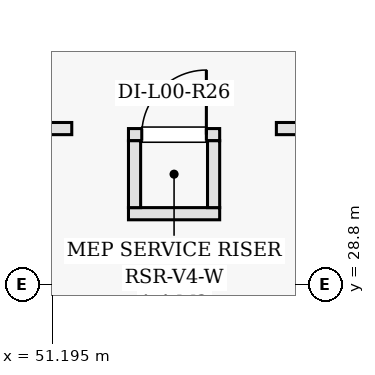
"""IFC4 building model, lengths in metres.
Left out: names, types, materials, properties, quantities, classifications, styles, units other than length and angle.
Written with IfcOpenShell. Run it as: python <this file> out.ifc"""

import sys

from ifc_helpers import new_model, si_unit, direction, frame, frame_2d, origin, place, context, subcontext, project, spatial, rectangle, extrude, element, fill, save


model = new_model("IFC4")
c1 = context("Model", 3, precision=1e-05, world=origin(), true_north=direction((0.0, 1.0)))
c2 = subcontext(c1, "Body", "Model", "MODEL_VIEW")
j1 = project(units=[si_unit("LENGTHUNIT", "METRE"), si_unit("PLANEANGLEUNIT", "RADIAN")], contexts=[c1])
p1 = place(None, origin())
s1 = spatial("IfcSite", under=j1, at=p1, CompositionType="ELEMENT")
p2 = place(p1, origin())
s2 = spatial("IfcBuilding", under=s1, at=p2, CompositionType="ELEMENT")
p3 = place(p2, origin())
s3 = spatial("IfcBuildingStorey", under=s2, at=p3, CompositionType="ELEMENT", Elevation=0.0)
p4 = place(p3, frame((52.2, 29.73, 0.0), z_axis=(0.0, 0.0, 1.0), x_axis=(1.0, 0.0, 0.0)))
e1 = element("IfcWall", 1, at=p4, inside=s3, PredefinedType="PARTITIONING", context=c2, shape_type="SweptSolid", body=[
    extrude(rectangle(XDim=1.2, YDim=0.16, at=frame_2d((0.6, 0.0))), origin(), (0.0, 0.0, 1.0), 4.52),
])
p5 = place(p3, frame((52.2, 30.77, 0.0), z_axis=(0.0, 0.0, 1.0), x_axis=(1.0, 0.0, 0.0)))
e2 = element("IfcWall", 2, at=p5, inside=s3, PredefinedType="PARTITIONING", context=c2, shape_type="SweptSolid", body=[
    extrude(rectangle(XDim=1.2, YDim=0.16, at=frame_2d((0.6, 0.0))), origin(), (0.0, 0.0, 1.0), 4.52),
])
p6 = place(p5, frame((0.175, 0.0, 0.0)))
e3 = element("IfcOpeningElement", 3, at=p6, cuts=e2, PredefinedType="OPENING", context=c2, shape_type="SweptSolid", body=[
    extrude(rectangle(XDim=0.85, YDim=2.02, at=frame_2d((0.425, 1.01))), frame((0.0, 0.09, 0.0), z_axis=(0.0, -1.0, 0.0), x_axis=(1.0, 0.0, 0.0)), (0.0, 0.0, 1.0), 0.18),
])
for number, where, z_axis, x_axis in (
    (4, (52.28, 29.81, 0.0), (0.0, 0.0, 1.0), (0.0, 1.0, 0.0)),
    (5, (53.32, 29.81, 0.0), (0.0, 0.0, 1.0), (0.0, 1.0, 0.0)),
):
    element("IfcWall", number, at=place(p3, frame(where, z_axis=z_axis, x_axis=x_axis)), inside=s3, PredefinedType="PARTITIONING", context=c2, shape_type="SweptSolid", body=[
        extrude(rectangle(XDim=0.88, YDim=0.16, at=frame_2d((0.44, 0.0))), origin(), (0.0, 0.0, 1.0), 4.52),
    ])
p7 = place(p3, frame((54.146, 30.85, 0.0), z_axis=(0.0, 0.0, 1.0), x_axis=(1.0, 0.0, 0.0)))
e6 = element("IfcWall", 6, at=p7, inside=s3, PredefinedType="PARTITIONING", context=c2, shape_type="SweptSolid", body=[
    extrude(rectangle(XDim=3.313, YDim=0.16, at=frame_2d((1.656, 0.0))), origin(), (0.0, 0.0, 1.0), 3.605),
])
p8 = place(p7, frame((1.107, 0.0, 0.0)))
e7 = element("IfcOpeningElement", 7, at=p8, cuts=e6, PredefinedType="OPENING", context=c2, shape_type="SweptSolid", body=[
    extrude(rectangle(XDim=1.1, YDim=2.15, at=frame_2d((0.55, 1.075))), frame((0.0, 0.09, 0.0), z_axis=(0.0, -1.0, 0.0), x_axis=(1.0, 0.0, 0.0)), (0.0, 0.0, 1.0), 0.18),
])
p9 = place(p3, frame((48.905, 30.85, 0.0), z_axis=(0.0, 0.0, 1.0), x_axis=(1.0, 0.0, 0.0)))
e8 = element("IfcWall", 8, at=p9, inside=s3, PredefinedType="PARTITIONING", context=c2, shape_type="SweptSolid", body=[
    extrude(rectangle(XDim=2.549, YDim=0.16, at=frame_2d((1.274, 0.0))), origin(), (0.0, 0.0, 1.0), 3.955),
])
p10 = place(p6, origin())
e9 = element("IfcDoor", 9, at=p10, inside=s3, OperationType="SINGLE_SWING_RIGHT", PredefinedType="DOOR", context=c2, shape_type="SweptSolid", body=[
    extrude(rectangle(XDim=0.85, YDim=2.02, at=frame_2d((0.425, 1.01))), frame((0.0, 0.025, 0.0), z_axis=(0.0, -1.0, 0.0), x_axis=(1.0, 0.0, 0.0)), (0.0, 0.0, 1.0), 0.05),
])
fill(e3, e9)
save(model, sys.argv[1])
